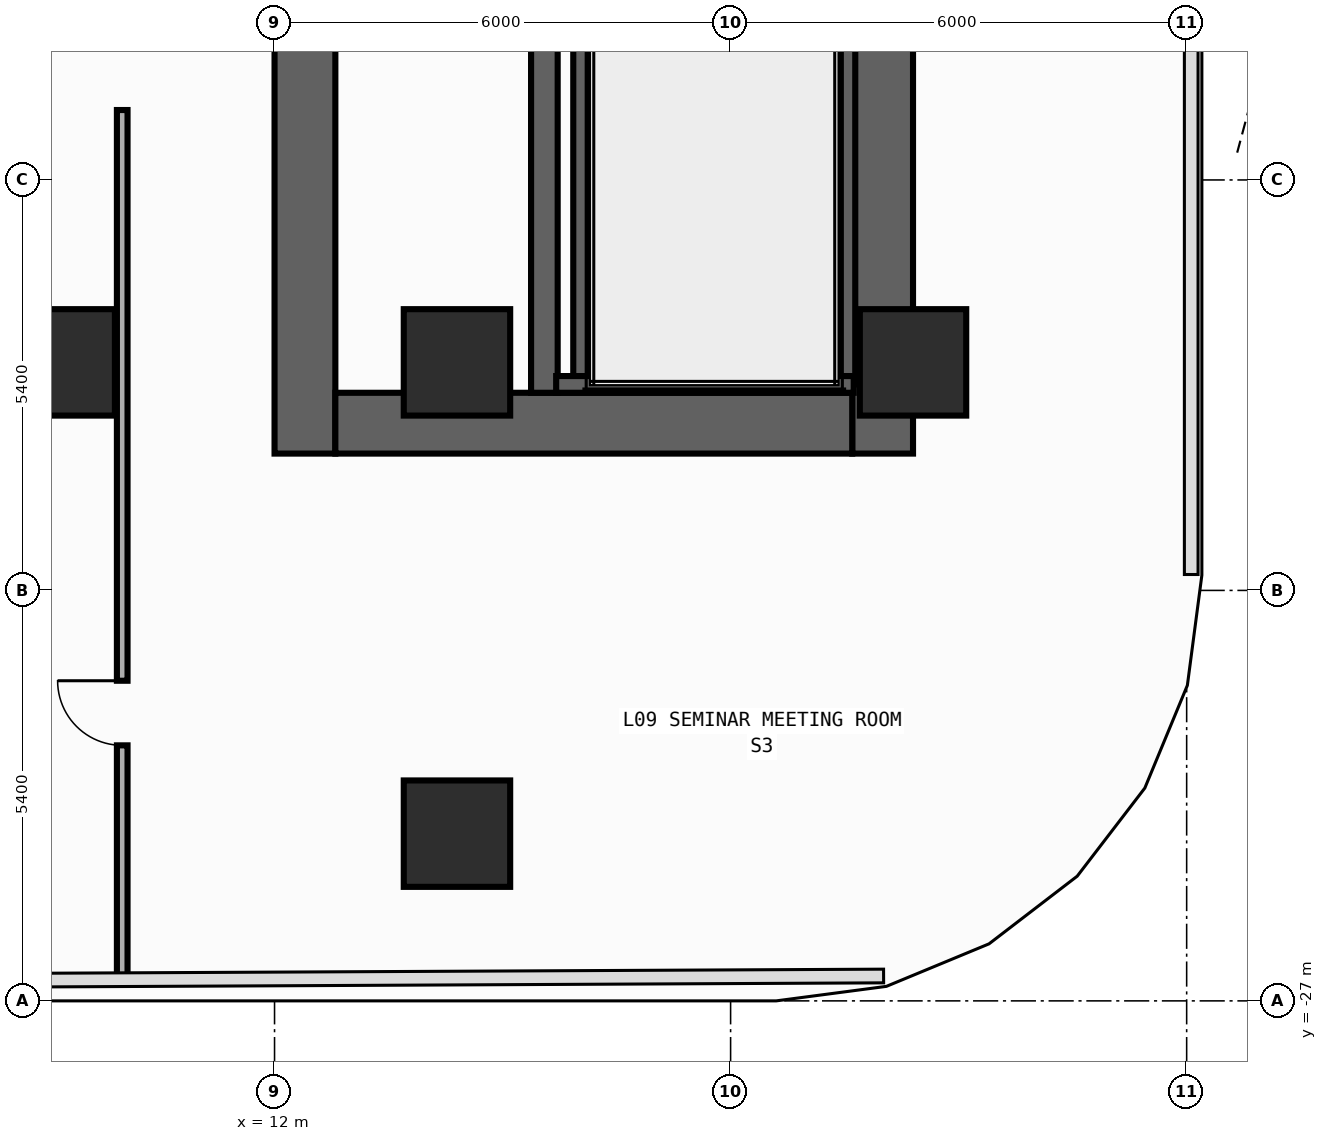
"""IFC4 building model, lengths in metres.
Left out: names, types, materials, properties, quantities, classifications, styles, units other than length and angle.
Written with IfcOpenShell. Run it as: python <this file> out.ifc"""

import sys

from ifc_helpers import new_model, si_unit, direction, frame, frame_2d, origin, origin_2d, place, context, subcontext, project, spatial, rectangle, extrude, element, fill, save


model = new_model("IFC4")
c1 = context("Model", 3, precision=1e-05, world=origin(), true_north=direction((0.0, 1.0)))
c2 = subcontext(c1, "Body", "Model", "MODEL_VIEW")
j1 = project(units=[si_unit("LENGTHUNIT", "METRE"), si_unit("PLANEANGLEUNIT", "RADIAN")], contexts=[c1])
p1 = place(None, origin())
s1 = spatial("IfcSite", under=j1, at=p1, CompositionType="ELEMENT")
p2 = place(p1, origin())
s2 = spatial("IfcBuilding", under=s1, at=p2, CompositionType="ELEMENT")
p3 = place(p2, frame((0.0, 0.0, 38.6)))
s3 = spatial("IfcBuildingStorey", under=s2, at=p3, CompositionType="ELEMENT", Elevation=38.6)
p4 = place(p3, frame((12.4, -19.8, 0.0), z_axis=(0.0, 0.0, 1.0), x_axis=(0.0, 1.0, 0.0)))
e1 = element("IfcWall", 1, at=p4, inside=s3, PredefinedType="SHEAR", context=c2, shape_type="SweptSolid", body=[
    extrude(rectangle(XDim=27.0, YDim=0.8, at=frame_2d((13.5, 0.0))), origin(), (0.0, 0.0, 1.0), 3.94),
])
p5 = place(p4, frame((23.05, 0.0, 0.0)))
e2 = element("IfcOpeningElement", 2, at=p5, cuts=e1, PredefinedType="OPENING", context=c2, shape_type="SweptSolid", body=[
    extrude(rectangle(XDim=1.1, YDim=2.2, at=frame_2d((0.55, 1.1))), frame((0.0, 0.41, 0.0), z_axis=(0.0, -1.0, 0.0), x_axis=(1.0, 0.0, 0.0)), (0.0, 0.0, 1.0), 0.82),
])
p6 = place(p4, frame((19.85, 0.0, 0.0)))
e3 = element("IfcOpeningElement", 3, at=p6, cuts=e1, PredefinedType="OPENING", context=c2, shape_type="SweptSolid", body=[
    extrude(rectangle(XDim=1.1, YDim=2.2, at=frame_2d((0.55, 1.1))), frame((0.0, 0.41, 0.0), z_axis=(0.0, -1.0, 0.0), x_axis=(1.0, 0.0, 0.0)), (0.0, 0.0, 1.0), 0.82),
])
p7 = place(p4, frame((16.65, 0.0, 0.0)))
e4 = element("IfcOpeningElement", 4, at=p7, cuts=e1, PredefinedType="OPENING", context=c2, shape_type="SweptSolid", body=[
    extrude(rectangle(XDim=1.1, YDim=2.2, at=frame_2d((0.55, 1.1))), frame((0.0, 0.41, 0.0), z_axis=(0.0, -1.0, 0.0), x_axis=(1.0, 0.0, 0.0)), (0.0, 0.0, 1.0), 0.82),
])
p8 = place(p4, frame((10.175, 0.0, 0.0)))
e5 = element("IfcOpeningElement", 5, at=p8, cuts=e1, PredefinedType="OPENING", context=c2, shape_type="SweptSolid", body=[
    extrude(rectangle(XDim=0.85, YDim=2.1, at=frame_2d((0.425, 1.05))), frame((0.0, 0.41, 0.0), z_axis=(0.0, -1.0, 0.0), x_axis=(1.0, 0.0, 0.0)), (0.0, 0.0, 1.0), 0.82),
])
p9 = place(p4, frame((12.725, 0.0, 0.0)))
e6 = element("IfcOpeningElement", 6, at=p9, cuts=e1, PredefinedType="OPENING", context=c2, shape_type="SweptSolid", body=[
    extrude(rectangle(XDim=1.15, YDim=2.2, at=frame_2d((0.575, 1.1))), frame((0.0, 0.41, 0.0), z_axis=(0.0, -1.0, 0.0), x_axis=(1.0, 0.0, 0.0)), (0.0, 0.0, 1.0), 0.82),
])
p10 = place(p4, frame((25.125, 0.0, 0.0)))
e7 = element("IfcOpeningElement", 7, at=p10, cuts=e1, PredefinedType="OPENING", context=c2, shape_type="SweptSolid", body=[
    extrude(rectangle(XDim=0.85, YDim=2.1, at=frame_2d((0.425, 1.05))), frame((0.0, 0.41, 0.0), z_axis=(0.0, -1.0, 0.0), x_axis=(1.0, 0.0, 0.0)), (0.0, 0.0, 1.0), 0.82),
])
p11 = place(p3, frame((20.0, -19.8, 0.0), z_axis=(0.0, 0.0, 1.0), x_axis=(0.0, 1.0, 0.0)))
e8 = element("IfcWall", 8, at=p11, inside=s3, PredefinedType="SHEAR", context=c2, shape_type="SweptSolid", body=[
    extrude(rectangle(XDim=27.0, YDim=0.8, at=frame_2d((13.5, 0.0))), origin(), (0.0, 0.0, 1.0), 3.94),
])
p12 = place(p3, frame((12.8, -19.4, 0.0), z_axis=(0.0, 0.0, 1.0), x_axis=(1.0, 0.0, 0.0)))
e9 = element("IfcWall", 9, at=p12, inside=s3, PredefinedType="SHEAR", context=c2, shape_type="SweptSolid", body=[
    extrude(rectangle(XDim=6.8, YDim=0.8, at=frame_2d((3.4, 0.0))), origin(), (0.0, 0.0, 1.0), 3.94),
])
p13 = place(p3, frame((15.55, -19.0, 0.0), z_axis=(0.0, 0.0, 1.0), x_axis=(0.0, 1.0, 0.0)))
e10 = element("IfcWall", 10, at=p13, inside=s3, PredefinedType="SHEAR", context=c2, shape_type="SweptSolid", body=[
    extrude(rectangle(XDim=25.4, YDim=0.35, at=frame_2d((12.7, 0.0))), origin(), (0.0, 0.0, 1.0), 3.94),
])
p14 = place(p13, frame((11.925, 0.0, 0.0)))
e11 = element("IfcOpeningElement", 11, at=p14, cuts=e10, PredefinedType="OPENING", context=c2, shape_type="SweptSolid", body=[
    extrude(rectangle(XDim=1.15, YDim=2.2, at=frame_2d((0.575, 1.1))), frame((0.0, 0.185, 0.0), z_axis=(0.0, -1.0, 0.0), x_axis=(1.0, 0.0, 0.0)), (0.0, 0.0, 1.0), 0.37),
])
p15 = place(p13, frame((24.325, 0.0, 0.0)))
e12 = element("IfcOpeningElement", 12, at=p15, cuts=e10, PredefinedType="OPENING", context=c2, shape_type="SweptSolid", body=[
    extrude(rectangle(XDim=0.85, YDim=2.1, at=frame_2d((0.425, 1.05))), frame((0.0, 0.185, 0.0), z_axis=(0.0, -1.0, 0.0), x_axis=(1.0, 0.0, 0.0)), (0.0, 0.0, 1.0), 0.37),
])
for number, where, z_axis, x_axis in (
    (13, (16.04, -18.89, 0.0), (0.0, 0.0, 1.0), (0.0, 1.0, 0.0)),
    (14, (19.53, -18.89, 0.0), (0.0, 0.0, 1.0), (0.0, 1.0, 0.0)),
):
    element("IfcWall", number, at=place(p3, frame(where, z_axis=z_axis, x_axis=x_axis)), inside=s3, PredefinedType="SHEAR", context=c2, shape_type="SweptSolid", body=[
        extrude(rectangle(XDim=11.3, YDim=0.22, at=frame_2d((5.65, 0.0))), origin(), (0.0, 0.0, 1.0), 3.94),
    ])
p16 = place(p3, frame((15.705, -18.89, 0.0), z_axis=(0.0, 0.0, 1.0), x_axis=(1.0, 0.0, 0.0)))
e15 = element("IfcWall", 15, at=p16, inside=s3, PredefinedType="SHEAR", context=c2, shape_type="SweptSolid", body=[
    extrude(rectangle(XDim=3.915, YDim=0.22, at=frame_2d((1.958, 0.0))), origin(), (0.0, 0.0, 1.0), 3.94),
])
for number, where, z_axis, x_axis in (
    (16, (9.2, -18.6, 0.0), (0.0, 0.0, 1.0), (1.0, 0.0, 0.0)),
    (17, (20.4, -18.6, 0.0), (0.0, 0.0, 1.0), (1.0, 0.0, 0.0)),
    (18, (14.4, -18.6, 0.0), (0.0, 0.0, 1.0), (1.0, 0.0, 0.0)),
    (19, (14.4, -24.8, 0.0), (0.0, 0.0, 1.0), (1.0, 0.0, 0.0)),
):
    element("IfcColumn", number, at=place(p3, frame(where, z_axis=z_axis, x_axis=x_axis)), inside=s3, PredefinedType="COLUMN", context=c2, shape_type="SweptSolid", body=[
        extrude(rectangle(XDim=1.4, YDim=1.4, at=origin_2d()), origin(), (0.0, 0.0, 1.0), 4.2),
    ])
p17 = place(p3, frame((9.996, -26.716, 0.0), z_axis=(0.0, 0.0, 1.0), x_axis=(0.0, 1.0, 0.0)))
e20 = element("IfcWall", 20, at=p17, inside=s3, PredefinedType="PARTITIONING", context=c2, shape_type="SweptSolid", body=[
    extrude(rectangle(XDim=11.436, YDim=0.14, at=frame_2d((5.718, 0.0))), origin(), (0.0, 0.0, 1.0), 3.94),
])
p18 = place(p17, frame((3.078, 0.0, 0.0)))
e21 = element("IfcOpeningElement", 21, at=p18, cuts=e20, PredefinedType="OPENING", context=c2, shape_type="SweptSolid", body=[
    extrude(rectangle(XDim=0.85, YDim=2.1, at=frame_2d((0.425, 1.05))), frame((0.0, 0.08, 0.0), z_axis=(0.0, -1.0, 0.0), x_axis=(1.0, 0.0, 0.0)), (0.0, 0.0, 1.0), 0.16),
])
p19 = place(p18, origin())
e22 = element("IfcDoor", 22, at=p19, inside=s3, OperationType="SINGLE_SWING_RIGHT", PredefinedType="DOOR", context=c2, shape_type="SweptSolid", body=[
    extrude(rectangle(XDim=0.85, YDim=2.1, at=frame_2d((0.425, 1.05))), frame((0.0, 0.025, 0.0), z_axis=(0.0, -1.0, 0.0), x_axis=(1.0, 0.0, 0.0)), (0.0, 0.0, 1.0), 0.05),
])
fill(e21, e22)
save(model, sys.argv[1])
